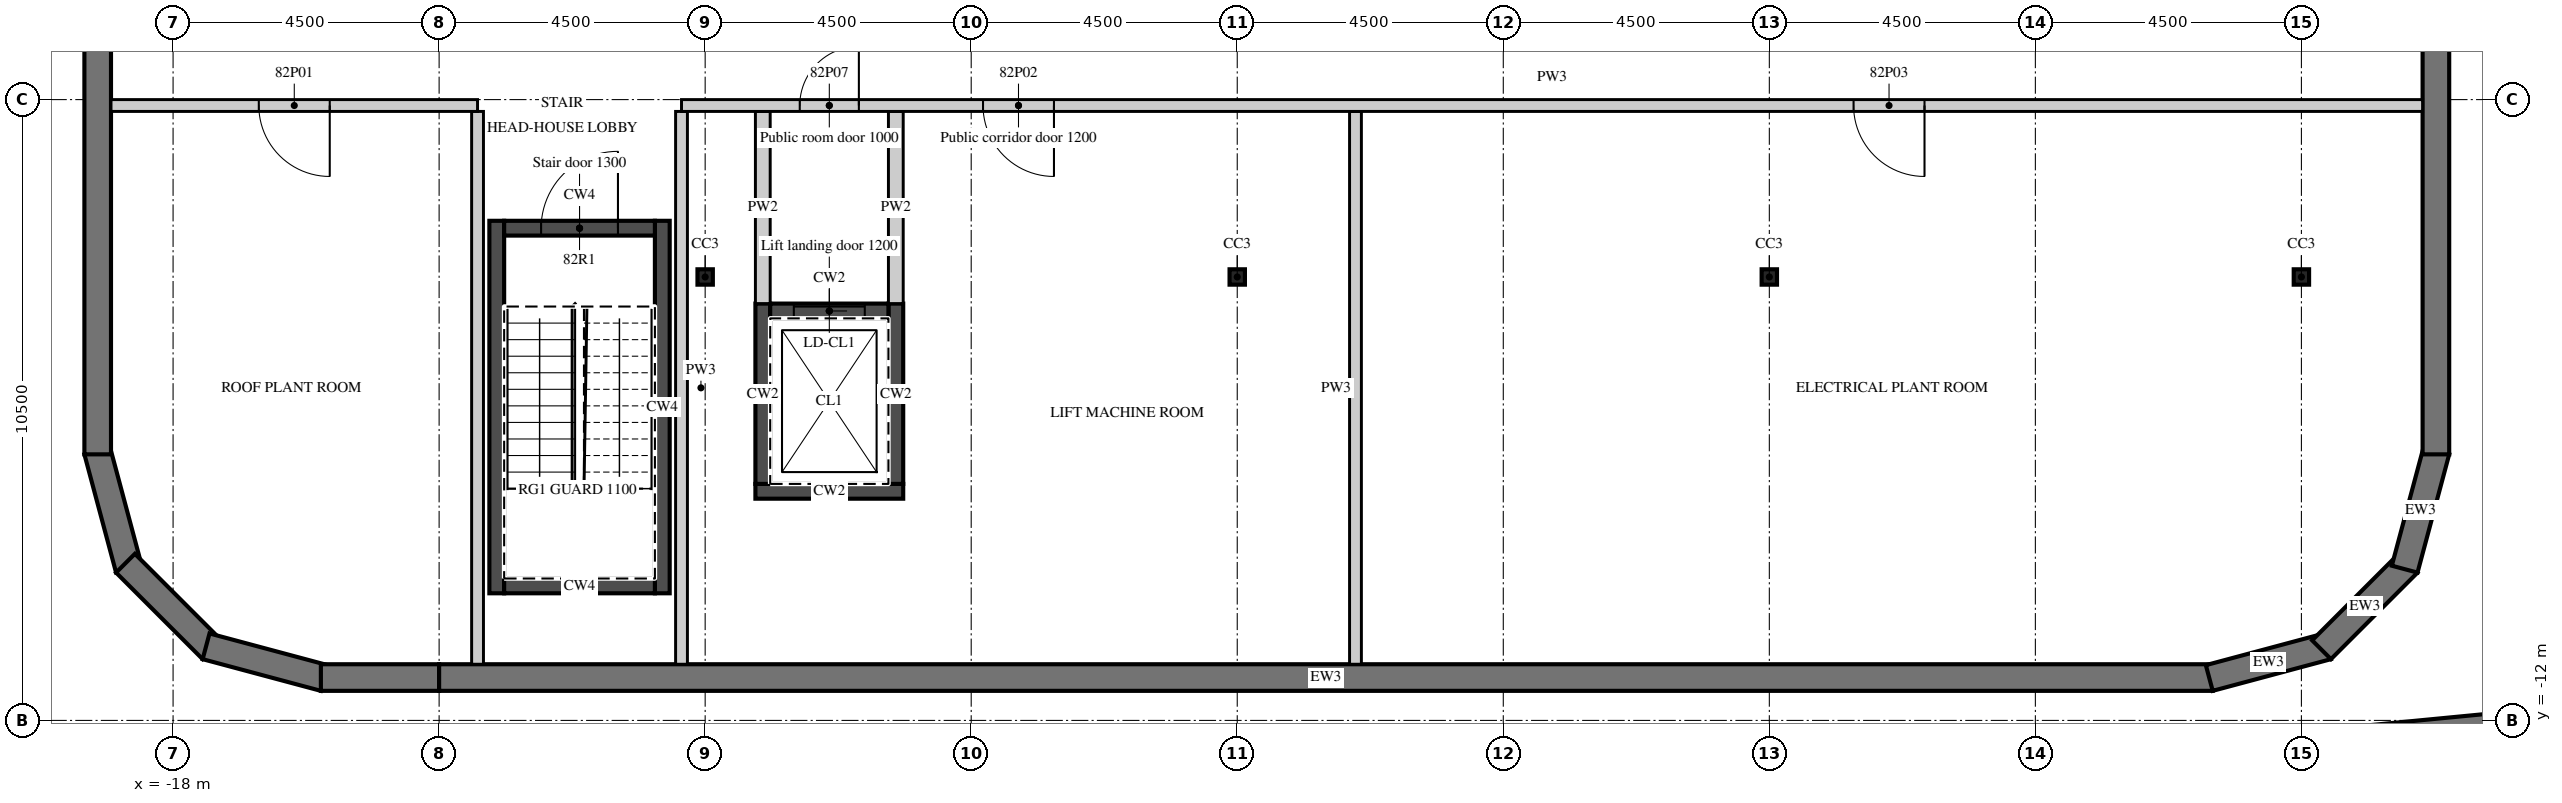
"""IFC4 building model, lengths in metres.
Left out: names, types, materials, properties, quantities, classifications, styles, units other than length and angle.
Written with IfcOpenShell. Run it as: python <this file> out.ifc"""

import sys

from ifc_helpers import new_model, si_unit, direction, frame, frame_2d, origin, origin_2d, place, context, subcontext, project, spatial, polyline, rectangle, i_section, outline, extrude, element, fill, save


model = new_model("IFC4")
c1 = context("Model", 3, precision=1e-05, world=origin(), true_north=direction((0.0, 1.0)))
c2 = subcontext(c1, "Body", "Model", "MODEL_VIEW")
j1 = project(units=[si_unit("LENGTHUNIT", "METRE"), si_unit("PLANEANGLEUNIT", "RADIAN")], contexts=[c1])
p1 = place(None, origin())
s1 = spatial("IfcSite", under=j1, at=p1, CompositionType="ELEMENT")
p2 = place(p1, origin())
s2 = spatial("IfcBuilding", under=s1, at=p2, CompositionType="ELEMENT")
p3 = place(p2, frame((0.0, 0.0, 325.8)))
s3 = spatial("IfcBuildingStorey", under=s2, at=p3, CompositionType="ELEMENT", Elevation=325.8)
for number, where, z_axis, x_axis in (
    (1, (-9.0, -4.5, 0.0), (0.0, 0.0, 1.0), (1.0, 0.0, 0.0)),
    (2, (0.0, -4.5, 0.0), (0.0, 0.0, 1.0), (1.0, 0.0, 0.0)),
    (3, (9.0, -4.5, 0.0), (0.0, 0.0, 1.0), (1.0, 0.0, 0.0)),
    (4, (18.0, -4.5, 0.0), (0.0, 0.0, 1.0), (1.0, 0.0, 0.0)),
):
    element("IfcColumn", number, at=place(p3, frame(where, z_axis=z_axis, x_axis=x_axis)), inside=s3, PredefinedType="COLUMN", context=c2, shape_type="SweptSolid", body=[
        extrude(i_section(OverallWidth=0.26, OverallDepth=0.26, WebThickness=0.01, FlangeThickness=0.018, FilletRadius=0.024, at=origin_2d()), origin(), (0.0, 0.0, 1.0), 4.0),
    ])
p4 = place(p3, frame((-19.283, -7.442, 0.0), z_axis=(0.0, 0.0, 1.0), x_axis=(0.25881466832, -0.965926999034, 0.0)))
e5 = element("IfcWall", 5, at=p4, inside=s3, PredefinedType="SOLIDWALL", context=c2, shape_type="SweptSolid", body=[
    extrude(outline(polyline([(0.0, -0.225), (2.071, -0.225), (1.95, 0.225), (0.121, 0.225), (0.0, -0.225)])), origin(), (0.0, 0.0, 1.0), 3.65),
])
p5 = place(p3, frame((-18.805, -9.341, 0.0), z_axis=(0.0, 0.0, 1.0), x_axis=(0.707106781187, -0.707106781187, 0.0)))
e6 = element("IfcWall", 6, at=p5, inside=s3, PredefinedType="SOLIDWALL", context=c2, shape_type="SweptSolid", body=[
    extrude(outline(polyline([(0.0, -0.225), (2.071, -0.225), (1.95, 0.225), (0.121, 0.225), (0.0, -0.225)])), origin(), (0.0, 0.0, 1.0), 3.65),
])
p6 = place(p3, frame((-17.442, -10.747, 0.0), z_axis=(0.0, 0.0, 1.0), x_axis=(0.965926999034, -0.25881466832, 0.0)))
e7 = element("IfcWall", 7, at=p6, inside=s3, PredefinedType="SOLIDWALL", context=c2, shape_type="SweptSolid", body=[
    extrude(outline(polyline([(-0.0, -0.225), (2.07, -0.225), (1.95, 0.225), (0.12, 0.225), (-0.0, -0.225)])), origin(), (0.0, 0.0, 1.0), 3.65),
])
p7 = place(p3, frame((-15.5, -11.275, 0.0), z_axis=(0.0, 0.0, 1.0), x_axis=(1.0, 0.0, 0.0)))
e8 = element("IfcWall", 8, at=p7, inside=s3, PredefinedType="SOLIDWALL", context=c2, shape_type="SweptSolid", body=[
    extrude(rectangle(XDim=2.0, YDim=0.45, at=frame_2d((1.0, 0.0))), origin(), (0.0, 0.0, 1.0), 3.65),
])
p8 = place(p3, frame((-13.5, -11.275, 0.0), z_axis=(0.0, 0.0, 1.0), x_axis=(1.0, 0.0, 0.0)))
e9 = element("IfcWall", 9, at=p8, inside=s3, PredefinedType="SOLIDWALL", context=c2, shape_type="SweptSolid", body=[
    extrude(rectangle(XDim=30.0, YDim=0.45, at=frame_2d((15.0, 0.0))), origin(), (0.0, 0.0, 1.0), 3.65),
])
p9 = place(p3, frame((16.442, -11.283, 0.0), z_axis=(0.0, 0.0, 1.0), x_axis=(0.965926999034, 0.25881466832, 0.0)))
e10 = element("IfcWall", 10, at=p9, inside=s3, PredefinedType="SOLIDWALL", context=c2, shape_type="SweptSolid", body=[
    extrude(outline(polyline([(0.0, -0.225), (2.071, -0.225), (1.95, 0.225), (0.121, 0.225), (0.0, -0.225)])), origin(), (0.0, 0.0, 1.0), 3.65),
])
p10 = place(p3, frame((18.341, -10.805, 0.0), z_axis=(0.0, 0.0, 1.0), x_axis=(0.707106781187, 0.707106781187, 0.0)))
e11 = element("IfcWall", 11, at=p10, inside=s3, PredefinedType="SOLIDWALL", context=c2, shape_type="SweptSolid", body=[
    extrude(outline(polyline([(0.0, -0.225), (2.071, -0.225), (1.95, 0.225), (0.121, 0.225), (0.0, -0.225)])), origin(), (0.0, 0.0, 1.0), 3.65),
])
p11 = place(p3, frame((19.747, -9.442, 0.0), z_axis=(0.0, 0.0, 1.0), x_axis=(0.25881466832, 0.965926999034, 0.0)))
e12 = element("IfcWall", 12, at=p11, inside=s3, PredefinedType="SOLIDWALL", context=c2, shape_type="SweptSolid", body=[
    extrude(outline(polyline([(-0.0, -0.225), (2.07, -0.225), (1.95, 0.225), (0.12, 0.225), (-0.0, -0.225)])), origin(), (0.0, 0.0, 1.0), 3.65),
])
for number, where, z_axis, x_axis in (
    (13, (20.275, -7.5, 0.0), (0.0, 0.0, 1.0), (0.0, 1.0, 0.0)),
    (14, (-19.275, 6.5, 0.0), (0.0, 0.0, 1.0), (0.0, -1.0, 0.0)),
):
    element("IfcWall", number, at=place(p3, frame(where, z_axis=z_axis, x_axis=x_axis)), inside=s3, PredefinedType="SOLIDWALL", context=c2, shape_type="SweptSolid", body=[
        extrude(rectangle(XDim=14.0, YDim=0.45, at=frame_2d((7.0, 0.0))), origin(), (0.0, 0.0, 1.0), 3.65),
    ])
p12 = place(p3, origin())
e15 = element("IfcWall", 15, at=p12, inside=s3, PredefinedType="PARAPET", context=c2, shape_type="SweptSolid", body=[
    extrude(outline(polyline([(22.856, -11.975), (22.799, -11.73), (-22.924, -16.132), (-22.933, -16.384), (22.856, -11.975)])), origin(), (0.0, 0.0, 1.0), 1.1),
])
p13 = place(p3, frame((-8.15, -8.125, 0.0), z_axis=(0.0, 0.0, 1.0), x_axis=(1.0, 0.0, 0.0)))
e16 = element("IfcWall", 16, at=p13, inside=s3, PredefinedType="SHEAR", context=c2, shape_type="SweptSolid", body=[
    extrude(rectangle(XDim=2.5, YDim=0.25, at=frame_2d((1.25, 0.0))), origin(), (0.0, 0.0, 1.0), 3.4),
])
for number, where, z_axis, x_axis in (
    (17, (-8.025, -8.0, 0.0), (0.0, 0.0, 1.0), (0.0, 1.0, 0.0)),
    (18, (-5.775, -8.0, 0.0), (0.0, 0.0, 1.0), (0.0, 1.0, 0.0)),
):
    element("IfcWall", number, at=place(p3, frame(where, z_axis=z_axis, x_axis=x_axis)), inside=s3, PredefinedType="SHEAR", context=c2, shape_type="SweptSolid", body=[
        extrude(rectangle(XDim=3.05, YDim=0.25, at=frame_2d((1.525, 0.0))), origin(), (0.0, 0.0, 1.0), 3.4),
    ])
p14 = place(p3, frame((-7.9, -5.075, 0.0), z_axis=(0.0, 0.0, 1.0), x_axis=(1.0, 0.0, 0.0)))
e19 = element("IfcWall", 19, at=p14, inside=s3, PredefinedType="SHEAR", context=c2, shape_type="SweptSolid", body=[
    extrude(rectangle(XDim=2.0, YDim=0.25, at=frame_2d((1.0, 0.0))), origin(), (0.0, 0.0, 1.0), 3.4),
])
p15 = place(p14, frame((0.4, 0.0, 0.0)))
e20 = element("IfcOpeningElement", 20, at=p15, cuts=e19, PredefinedType="OPENING", context=c2, shape_type="SweptSolid", body=[
    extrude(rectangle(XDim=1.2, YDim=2.1, at=frame_2d((0.6, 1.05))), frame((0.0, 0.135, 0.0), z_axis=(0.0, -1.0, 0.0), x_axis=(1.0, 0.0, 0.0)), (0.0, 0.0, 1.0), 0.27),
])
for number, where, z_axis, x_axis in (
    (21, (-8.025, -4.95, 0.0), (0.0, 0.0, 1.0), (0.0, 1.0, 0.0)),
    (22, (-5.775, -4.95, 0.0), (0.0, 0.0, 1.0), (0.0, 1.0, 0.0)),
):
    element("IfcWall", number, at=place(p3, frame(where, z_axis=z_axis, x_axis=x_axis)), inside=s3, PredefinedType="PARTITIONING", context=c2, shape_type="SweptSolid", body=[
        extrude(rectangle(XDim=3.25, YDim=0.25, at=frame_2d((1.625, 0.0))), origin(), (0.0, 0.0, 1.0), 3.4),
    ])
for number, where, z_axis, x_axis in (
    (23, (-12.525, -9.85, 0.0), (0.0, 0.0, 1.0), (0.0, 1.0, 0.0)),
    (24, (-9.725, -9.85, 0.0), (0.0, 0.0, 1.0), (0.0, 1.0, 0.0)),
):
    element("IfcWall", number, at=place(p3, frame(where, z_axis=z_axis, x_axis=x_axis)), inside=s3, PredefinedType="SHEAR", context=c2, shape_type="SweptSolid", body=[
        extrude(rectangle(XDim=6.3, YDim=0.25, at=frame_2d((3.15, 0.0))), origin(), (0.0, 0.0, 1.0), 3.65),
    ])
p16 = place(p3, frame((-12.4, -9.725, 0.0), z_axis=(0.0, 0.0, 1.0), x_axis=(1.0, 0.0, 0.0)))
e25 = element("IfcWall", 25, at=p16, inside=s3, PredefinedType="SHEAR", context=c2, shape_type="SweptSolid", body=[
    extrude(rectangle(XDim=2.55, YDim=0.25, at=frame_2d((1.275, 0.0))), origin(), (0.0, 0.0, 1.0), 3.65),
])
p17 = place(p3, frame((-12.4, -3.675, 0.0), z_axis=(0.0, 0.0, 1.0), x_axis=(1.0, 0.0, 0.0)))
e26 = element("IfcWall", 26, at=p17, inside=s3, PredefinedType="SHEAR", context=c2, shape_type="SweptSolid", body=[
    extrude(rectangle(XDim=2.55, YDim=0.25, at=frame_2d((1.275, 0.0))), origin(), (0.0, 0.0, 1.0), 3.65),
])
p18 = place(p17, frame((0.625, 0.0, 0.0)))
e27 = element("IfcOpeningElement", 27, at=p18, cuts=e26, PredefinedType="OPENING", context=c2, shape_type="SweptSolid", body=[
    extrude(rectangle(XDim=1.3, YDim=2.1, at=frame_2d((0.65, 1.05))), frame((0.0, 0.135, 0.0), z_axis=(0.0, -1.0, 0.0), x_axis=(1.0, 0.0, 0.0)), (0.0, 0.0, 1.0), 0.27),
])
for number, where, z_axis, x_axis in (
    (28, (-12.85, -11.05, 0.0), (0.0, 0.0, 1.0), (0.0, 1.0, 0.0)),
    (29, (-9.4, -11.05, 0.0), (0.0, 0.0, 1.0), (0.0, 1.0, 0.0)),
    (30, (2.0, -11.05, 0.0), (0.0, 0.0, 1.0), (0.0, 1.0, 0.0)),
):
    element("IfcWall", number, at=place(p3, frame(where, z_axis=z_axis, x_axis=x_axis)), inside=s3, PredefinedType="PARTITIONING", context=c2, shape_type="SweptSolid", body=[
        extrude(rectangle(XDim=9.35, YDim=0.2, at=frame_2d((4.675, 0.0))), origin(), (0.0, 0.0, 1.0), 3.65),
    ])
p19 = place(p3, frame((-19.05, -1.6, 0.0), z_axis=(0.0, 0.0, 1.0), x_axis=(1.0, 0.0, 0.0)))
e31 = element("IfcWall", 31, at=p19, inside=s3, PredefinedType="PARTITIONING", context=c2, shape_type="SweptSolid", body=[
    extrude(rectangle(XDim=6.2, YDim=0.2, at=frame_2d((3.1, 0.0))), origin(), (0.0, 0.0, 1.0), 3.65),
])
p20 = place(p19, frame((2.5, 0.0, 0.0)))
e32 = element("IfcOpeningElement", 32, at=p20, cuts=e31, PredefinedType="OPENING", context=c2, shape_type="SweptSolid", body=[
    extrude(rectangle(XDim=1.2, YDim=2.1, at=frame_2d((0.6, 1.05))), frame((0.0, 0.11, 0.0), z_axis=(0.0, -1.0, 0.0), x_axis=(1.0, 0.0, 0.0)), (0.0, 0.0, 1.0), 0.22),
])
p21 = place(p3, frame((-9.4, -1.6, 0.0), z_axis=(0.0, 0.0, 1.0), x_axis=(1.0, 0.0, 0.0)))
e33 = element("IfcWall", 33, at=p21, inside=s3, PredefinedType="PARTITIONING", context=c2, shape_type="SweptSolid", body=[
    extrude(rectangle(XDim=29.45, YDim=0.2, at=frame_2d((14.725, 0.0))), origin(), (0.0, 0.0, 1.0), 3.25),
])
p22 = place(p21, frame((5.1, 0.0, 0.0)))
e34 = element("IfcOpeningElement", 34, at=p22, cuts=e33, PredefinedType="OPENING", context=c2, shape_type="SweptSolid", body=[
    extrude(rectangle(XDim=1.2, YDim=2.1, at=frame_2d((0.6, 1.05))), frame((0.0, 0.11, 0.0), z_axis=(0.0, -1.0, 0.0), x_axis=(1.0, 0.0, 0.0)), (0.0, 0.0, 1.0), 0.22),
])
p23 = place(p21, frame((19.825, 0.0, 0.0)))
e35 = element("IfcOpeningElement", 35, at=p23, cuts=e33, PredefinedType="OPENING", context=c2, shape_type="SweptSolid", body=[
    extrude(rectangle(XDim=1.2, YDim=2.1, at=frame_2d((0.6, 1.05))), frame((0.0, 0.11, 0.0), z_axis=(0.0, -1.0, 0.0), x_axis=(1.0, 0.0, 0.0)), (0.0, 0.0, 1.0), 0.22),
])
p24 = place(p21, frame((2.0, 0.0, 0.0)))
e36 = element("IfcOpeningElement", 36, at=p24, cuts=e33, PredefinedType="OPENING", context=c2, shape_type="SweptSolid", body=[
    extrude(rectangle(XDim=1.0, YDim=2.1, at=frame_2d((0.5, 1.05))), frame((0.0, 0.11, 0.0), z_axis=(0.0, -1.0, 0.0), x_axis=(1.0, 0.0, 0.0)), (0.0, 0.0, 1.0), 0.22),
])
p25 = place(p15, origin())
e37 = element("IfcDoor", 37, at=p25, inside=s3, OperationType="SLIDING_TO_LEFT", PredefinedType="DOOR", context=c2, shape_type="SweptSolid", body=[
    extrude(rectangle(XDim=1.2, YDim=2.1, at=frame_2d((0.6, 1.05))), frame((0.0, 0.025, 0.0), z_axis=(0.0, -1.0, 0.0), x_axis=(1.0, 0.0, 0.0)), (0.0, 0.0, 1.0), 0.05),
])
fill(e20, e37)
p26 = place(p18, origin())
e38 = element("IfcDoor", 38, at=p26, inside=s3, OperationType="SINGLE_SWING_RIGHT", PredefinedType="DOOR", context=c2, shape_type="SweptSolid", body=[
    extrude(rectangle(XDim=1.3, YDim=2.1, at=frame_2d((0.65, 1.05))), frame((0.0, 0.025, 0.0), z_axis=(0.0, -1.0, 0.0), x_axis=(1.0, 0.0, 0.0)), (0.0, 0.0, 1.0), 0.05),
])
fill(e27, e38)
p27 = place(p20, origin())
e39 = element("IfcDoor", 39, at=p27, inside=s3, OperationType="SINGLE_SWING_RIGHT", PredefinedType="DOOR", context=c2, shape_type="SweptSolid", body=[
    extrude(rectangle(XDim=1.2, YDim=2.1, at=frame_2d((0.6, 1.05))), frame((0.0, 0.025, 0.0), z_axis=(0.0, -1.0, 0.0), x_axis=(1.0, 0.0, 0.0)), (0.0, 0.0, 1.0), 0.05),
])
fill(e32, e39)
p28 = place(p22, origin())
e40 = element("IfcDoor", 40, at=p28, inside=s3, OperationType="SINGLE_SWING_RIGHT", PredefinedType="DOOR", context=c2, shape_type="SweptSolid", body=[
    extrude(rectangle(XDim=1.2, YDim=2.1, at=frame_2d((0.6, 1.05))), frame((0.0, 0.025, 0.0), z_axis=(0.0, -1.0, 0.0), x_axis=(1.0, 0.0, 0.0)), (0.0, 0.0, 1.0), 0.05),
])
fill(e34, e40)
p29 = place(p23, origin())
e41 = element("IfcDoor", 41, at=p29, inside=s3, OperationType="SINGLE_SWING_RIGHT", PredefinedType="DOOR", context=c2, shape_type="SweptSolid", body=[
    extrude(rectangle(XDim=1.2, YDim=2.1, at=frame_2d((0.6, 1.05))), frame((0.0, 0.025, 0.0), z_axis=(0.0, -1.0, 0.0), x_axis=(1.0, 0.0, 0.0)), (0.0, 0.0, 1.0), 0.05),
])
fill(e35, e41)
p30 = place(p24, origin())
e42 = element("IfcDoor", 42, at=p30, inside=s3, OperationType="SINGLE_SWING_RIGHT", PredefinedType="DOOR", context=c2, shape_type="SweptSolid", body=[
    extrude(rectangle(XDim=1.0, YDim=2.1, at=frame_2d((0.5, 1.05))), frame((0.0, 0.025, 0.0), z_axis=(0.0, -1.0, 0.0), x_axis=(1.0, 0.0, 0.0)), (0.0, 0.0, 1.0), 0.05),
])
fill(e36, e42)
save(model, sys.argv[1])
